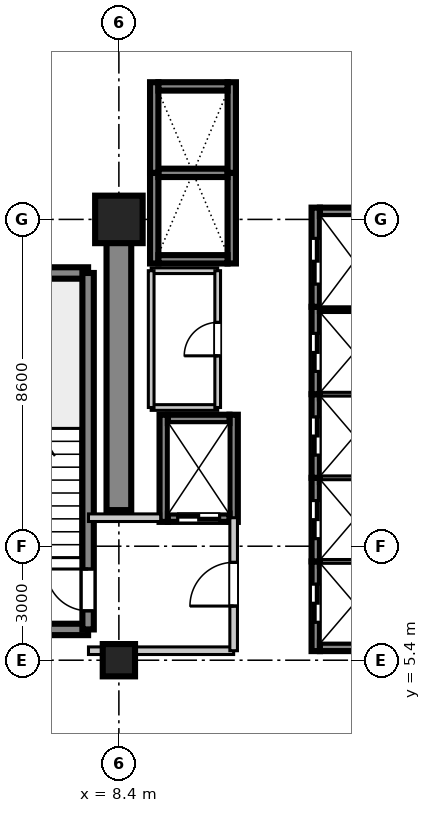
"""IFC4 building model, lengths in metres.
Left out: names, types, materials, properties, quantities, classifications, styles, units other than length and angle.
Written with IfcOpenShell. Run it as: python <this file> out.ifc"""

import sys

from ifc_helpers import new_model, si_unit, direction, frame, frame_2d, origin, origin_2d, place, context, subcontext, project, spatial, rectangle, extrude, source, transform, mapped, element, fill, save


model = new_model("IFC4")
c1 = context("Model", 3, precision=1e-05, world=origin(), true_north=direction((0.0, 1.0)))
c2 = subcontext(c1, "Body", "Model", "MODEL_VIEW")
j1 = project(units=[si_unit("LENGTHUNIT", "METRE"), si_unit("PLANEANGLEUNIT", "RADIAN")], contexts=[c1])
p1 = place(None, origin())
s1 = spatial("IfcSite", under=j1, at=p1, CompositionType="ELEMENT")
p2 = place(p1, origin())
s2 = spatial("IfcBuilding", under=s1, at=p2, CompositionType="ELEMENT")
p3 = place(p2, frame((0.0, 0.0, 124.8)))
s3 = spatial("IfcBuildingStorey", under=s2, at=p3, CompositionType="ELEMENT", Elevation=124.8)
m1 = source(origin(), c2, "Body", "SweptSolid", [
    extrude(rectangle(XDim=0.85, YDim=0.85, at=origin_2d()), origin(), (0.0, 0.0, 1.0), 3.605),
])
p4 = place(p3, frame((8.4, 5.4, 0.0), z_axis=(0.0, 0.0, 1.0), x_axis=(1.0, 0.0, 0.0)))
e1 = element("IfcColumn", 1, at=p4, inside=s3, PredefinedType="PILASTER", context=c2, shape_type="MappedRepresentation", body=[
    mapped(m1, transform((0.0, 0.0, 0.0), scale=1.0)),
])
m2 = source(origin(), c2, "Body", "SweptSolid", [
    extrude(rectangle(XDim=1.25, YDim=1.25, at=origin_2d()), origin(), (0.0, 0.0, 1.0), 3.605),
])
p5 = place(p3, frame((8.4, 17.0, 0.0), z_axis=(0.0, 0.0, 1.0), x_axis=(1.0, 0.0, 0.0)))
e2 = element("IfcColumn", 2, at=p5, inside=s3, PredefinedType="COLUMN", context=c2, shape_type="MappedRepresentation", body=[
    mapped(m2, transform((0.0, 0.0, 0.0), scale=1.0)),
])
m3 = source(origin(), c2, "Body", "SweptSolid", [
    extrude(rectangle(XDim=7.65, YDim=0.65, at=frame_2d((3.825, 0.0))), origin(), (0.0, 0.0, 1.0), 3.38),
])
p6 = place(p3, frame((8.4, 9.35, 0.0), z_axis=(0.0, 0.0, 1.0), x_axis=(0.0, 1.0, 0.0)))
e3 = element("IfcWall", 3, at=p6, inside=s3, PredefinedType="SHEAR", context=c2, shape_type="MappedRepresentation", body=[
    mapped(m3, transform((0.0, 0.0, 0.0), scale=1.0)),
])
m4 = source(origin(), c2, "Body", "SweptSolid", [
    extrude(rectangle(XDim=3.98, YDim=0.3, at=frame_2d((1.99, 0.0))), origin(), (0.0, 0.0, 1.0), 3.38),
])
for number, where, z_axis, x_axis in (
    (4, (3.61, 6.21, 0.0), (0.0, 0.0, 1.0), (1.0, 0.0, 0.0)),
    (5, (3.61, 15.59, 0.0), (0.0, 0.0, 1.0), (1.0, 0.0, 0.0)),
):
    element("IfcWall", number, at=place(p3, frame(where, z_axis=z_axis, x_axis=x_axis)), inside=s3, PredefinedType="SHEAR", context=c2, shape_type="MappedRepresentation", body=[
        mapped(m4, transform((0.0, 0.0, 0.0), scale=1.0)),
    ])
m5 = source(origin(), c2, "Body", "SweptSolid", [
    extrude(rectangle(XDim=9.38, YDim=0.3, at=frame_2d((4.69, 0.0))), origin(), (0.0, 0.0, 1.0), 3.38),
])
p7 = place(p3, frame((7.59, 6.21, 0.0), z_axis=(0.0, 0.0, 1.0), x_axis=(0.0, 1.0, 0.0)))
e6 = element("IfcWall", 6, at=p7, inside=s3, PredefinedType="SHEAR", context=c2, shape_type="MappedRepresentation", body=[
    mapped(m5, transform((0.0, 0.0, 0.0), scale=1.0)),
])
p8 = place(p7, frame((0.49, 0.0, 0.0)))
e7 = element("IfcOpeningElement", 7, at=p8, cuts=e6, PredefinedType="OPENING", context=c2, shape_type="SweptSolid", body=[
    extrude(rectangle(XDim=1.1, YDim=2.15, at=frame_2d((0.55, 1.075))), frame((0.0, 0.16, 0.0), z_axis=(0.0, -1.0, 0.0), x_axis=(1.0, 0.0, 0.0)), (0.0, 0.0, 1.0), 0.32),
])
m6 = source(origin(), c2, "Body", "SweptSolid", [
    extrude(rectangle(XDim=2.36, YDim=0.22, at=frame_2d((1.18, 0.0))), origin(), (0.0, 0.0, 1.0), 3.38),
])
p9 = place(p3, frame((13.58, 5.64, 0.0), z_axis=(0.0, 0.0, 1.0), x_axis=(0.0, 1.0, 0.0)))
e8 = element("IfcWall", 8, at=p9, inside=s3, PredefinedType="SHEAR", context=c2, shape_type="MappedRepresentation", body=[
    mapped(m6, transform((0.0, 0.0, 0.0), scale=1.0)),
])
p10 = place(p9, frame((0.76, 0.0, 0.0)))
e9 = element("IfcOpeningElement", 9, at=p10, cuts=e8, PredefinedType="OPENING", context=c2, shape_type="SweptSolid", body=[
    extrude(rectangle(XDim=1.0, YDim=2.2, at=frame_2d((0.5, 1.1))), frame((0.0, 0.12, 0.0), z_axis=(0.0, -1.0, 0.0), x_axis=(1.0, 0.0, 0.0)), (0.0, 0.0, 1.0), 0.24),
])
m7 = source(origin(), c2, "Body", "SweptSolid", [
    extrude(rectangle(XDim=1.82, YDim=0.22, at=frame_2d((0.91, 0.0))), origin(), (0.0, 0.0, 1.0), 3.38),
])
p11 = place(p3, frame((13.69, 5.75, 0.0), z_axis=(0.0, 0.0, 1.0), x_axis=(1.0, 0.0, 0.0)))
e10 = element("IfcWall", 10, at=p11, inside=s3, PredefinedType="SHEAR", context=c2, shape_type="MappedRepresentation", body=[
    mapped(m7, transform((0.0, 0.0, 0.0), scale=1.0)),
])
m8 = source(origin(), c2, "Body", "SweptSolid", [
    extrude(rectangle(XDim=1.82, YDim=0.22, at=frame_2d((0.91, 0.0))), origin(), (0.0, 0.0, 1.0), 3.65),
])
p12 = place(p3, frame((13.69, 8.0, 0.0), z_axis=(0.0, 0.0, 1.0), x_axis=(1.0, 0.0, 0.0)))
e11 = element("IfcWall", 11, at=p12, inside=s3, PredefinedType="SHEAR", context=c2, shape_type="MappedRepresentation", body=[
    mapped(m8, transform((0.0, 0.0, 0.0), scale=1.0)),
])
m9 = source(origin(), c2, "Body", "SweptSolid", [
    extrude(rectangle(XDim=2.2, YDim=0.22, at=frame_2d((1.1, 0.0))), origin(), (0.0, 0.0, 1.0), 3.38),
])
p13 = place(p3, frame((13.58, 8.0, 0.0), z_axis=(0.0, 0.0, 1.0), x_axis=(0.0, 1.0, 0.0)))
e12 = element("IfcWall", 12, at=p13, inside=s3, PredefinedType="SHEAR", context=c2, shape_type="MappedRepresentation", body=[
    mapped(m9, transform((0.0, 0.0, 0.0), scale=1.0)),
])
p14 = place(p13, frame((0.6, 0.0, 0.0)))
e13 = element("IfcOpeningElement", 13, at=p14, cuts=e12, PredefinedType="OPENING", context=c2, shape_type="SweptSolid", body=[
    extrude(rectangle(XDim=1.0, YDim=2.2, at=frame_2d((0.5, 1.1))), frame((0.0, 0.12, 0.0), z_axis=(0.0, -1.0, 0.0), x_axis=(1.0, 0.0, 0.0)), (0.0, 0.0, 1.0), 0.24),
])
p15 = place(p3, frame((13.69, 10.2, 0.0), z_axis=(0.0, 0.0, 1.0), x_axis=(1.0, 0.0, 0.0)))
e14 = element("IfcWall", 14, at=p15, inside=s3, PredefinedType="SHEAR", context=c2, shape_type="MappedRepresentation", body=[
    mapped(m8, transform((0.0, 0.0, 0.0), scale=1.0)),
])
p16 = place(p3, frame((13.58, 10.2, 0.0), z_axis=(0.0, 0.0, 1.0), x_axis=(0.0, 1.0, 0.0)))
e15 = element("IfcWall", 15, at=p16, inside=s3, PredefinedType="SHEAR", context=c2, shape_type="MappedRepresentation", body=[
    mapped(m9, transform((0.0, 0.0, 0.0), scale=1.0)),
])
p17 = place(p16, frame((0.6, 0.0, 0.0)))
e16 = element("IfcOpeningElement", 16, at=p17, cuts=e15, PredefinedType="OPENING", context=c2, shape_type="SweptSolid", body=[
    extrude(rectangle(XDim=1.0, YDim=2.2, at=frame_2d((0.5, 1.1))), frame((0.0, 0.12, 0.0), z_axis=(0.0, -1.0, 0.0), x_axis=(1.0, 0.0, 0.0)), (0.0, 0.0, 1.0), 0.24),
])
p18 = place(p3, frame((13.69, 12.4, 0.0), z_axis=(0.0, 0.0, 1.0), x_axis=(1.0, 0.0, 0.0)))
e17 = element("IfcWall", 17, at=p18, inside=s3, PredefinedType="SHEAR", context=c2, shape_type="MappedRepresentation", body=[
    mapped(m8, transform((0.0, 0.0, 0.0), scale=1.0)),
])
m10 = source(origin(), c2, "Body", "SweptSolid", [
    extrude(rectangle(XDim=2.3, YDim=0.22, at=frame_2d((1.15, 0.0))), origin(), (0.0, 0.0, 1.0), 3.38),
])
p19 = place(p3, frame((13.58, 12.4, 0.0), z_axis=(0.0, 0.0, 1.0), x_axis=(0.0, 1.0, 0.0)))
e18 = element("IfcWall", 18, at=p19, inside=s3, PredefinedType="SHEAR", context=c2, shape_type="MappedRepresentation", body=[
    mapped(m10, transform((0.0, 0.0, 0.0), scale=1.0)),
])
p20 = place(p19, frame((0.6, 0.0, 0.0)))
e19 = element("IfcOpeningElement", 19, at=p20, cuts=e18, PredefinedType="OPENING", context=c2, shape_type="SweptSolid", body=[
    extrude(rectangle(XDim=1.0, YDim=2.2, at=frame_2d((0.5, 1.1))), frame((0.0, 0.12, 0.0), z_axis=(0.0, -1.0, 0.0), x_axis=(1.0, 0.0, 0.0)), (0.0, 0.0, 1.0), 0.24),
])
p21 = place(p3, frame((13.69, 14.7, 0.0), z_axis=(0.0, 0.0, 1.0), x_axis=(1.0, 0.0, 0.0)))
e20 = element("IfcWall", 20, at=p21, inside=s3, PredefinedType="SHEAR", context=c2, shape_type="MappedRepresentation", body=[
    mapped(m8, transform((0.0, 0.0, 0.0), scale=1.0)),
])
m11 = source(origin(), c2, "Body", "SweptSolid", [
    extrude(rectangle(XDim=2.385, YDim=0.22, at=frame_2d((1.192, 0.0))), origin(), (0.0, 0.0, 1.0), 3.38),
])
for number, where, z_axis, x_axis in (
    (21, (9.33, 15.84, 0.0), (0.0, 0.0, 1.0), (0.0, 1.0, 0.0)),
    (22, (11.37, 15.84, 0.0), (0.0, 0.0, 1.0), (0.0, 1.0, 0.0)),
):
    element("IfcWall", number, at=place(p3, frame(where, z_axis=z_axis, x_axis=x_axis)), inside=s3, PredefinedType="SHEAR", context=c2, shape_type="MappedRepresentation", body=[
        mapped(m11, transform((0.0, 0.0, 0.0), scale=1.0)),
    ])
p22 = place(p3, frame((9.44, 15.95, 0.0), z_axis=(0.0, 0.0, 1.0), x_axis=(1.0, 0.0, 0.0)))
e23 = element("IfcWall", 23, at=p22, inside=s3, PredefinedType="SHEAR", context=c2, shape_type="MappedRepresentation", body=[
    mapped(m7, transform((0.0, 0.0, 0.0), scale=1.0)),
])
p23 = place(p3, frame((9.44, 18.225, 0.0), z_axis=(0.0, 0.0, 1.0), x_axis=(1.0, 0.0, 0.0)))
e24 = element("IfcWall", 24, at=p23, inside=s3, PredefinedType="SHEAR", context=c2, shape_type="MappedRepresentation", body=[
    mapped(m8, transform((0.0, 0.0, 0.0), scale=1.0)),
])
for number, where, z_axis, x_axis in (
    (25, (9.33, 18.225, 0.0), (0.0, 0.0, 1.0), (0.0, 1.0, 0.0)),
    (26, (11.37, 18.225, 0.0), (0.0, 0.0, 1.0), (0.0, 1.0, 0.0)),
):
    element("IfcWall", number, at=place(p3, frame(where, z_axis=z_axis, x_axis=x_axis)), inside=s3, PredefinedType="SHEAR", context=c2, shape_type="MappedRepresentation", body=[
        mapped(m11, transform((0.0, 0.0, 0.0), scale=1.0)),
    ])
p24 = place(p3, frame((9.44, 20.5, 0.0), z_axis=(0.0, 0.0, 1.0), x_axis=(1.0, 0.0, 0.0)))
e27 = element("IfcWall", 27, at=p24, inside=s3, PredefinedType="SHEAR", context=c2, shape_type="MappedRepresentation", body=[
    mapped(m7, transform((0.0, 0.0, 0.0), scale=1.0)),
])
m12 = source(origin(), c2, "Body", "SweptSolid", [
    extrude(rectangle(XDim=2.82, YDim=0.22, at=frame_2d((1.41, 0.0))), origin(), (0.0, 0.0, 1.0), 3.38),
])
for number, where, z_axis, x_axis in (
    (28, (9.58, 9.04, 0.0), (0.0, 0.0, 1.0), (0.0, 1.0, 0.0)),
    (29, (11.42, 9.04, 0.0), (0.0, 0.0, 1.0), (0.0, 1.0, 0.0)),
):
    element("IfcWall", number, at=place(p3, frame(where, z_axis=z_axis, x_axis=x_axis)), inside=s3, PredefinedType="SHEAR", context=c2, shape_type="MappedRepresentation", body=[
        mapped(m12, transform((0.0, 0.0, 0.0), scale=1.0)),
    ])
m13 = source(origin(), c2, "Body", "SweptSolid", [
    extrude(rectangle(XDim=1.62, YDim=0.22, at=frame_2d((0.81, 0.0))), origin(), (0.0, 0.0, 1.0), 3.38),
])
p25 = place(p3, frame((9.69, 9.15, 0.0), z_axis=(0.0, 0.0, 1.0), x_axis=(1.0, 0.0, 0.0)))
e30 = element("IfcWall", 30, at=p25, inside=s3, PredefinedType="SHEAR", context=c2, shape_type="MappedRepresentation", body=[
    mapped(m13, transform((0.0, 0.0, 0.0), scale=1.0)),
])
p26 = place(p25, frame((0.26, 0.0, 0.0)))
e31 = element("IfcOpeningElement", 31, at=p26, cuts=e30, PredefinedType="OPENING", context=c2, shape_type="SweptSolid", body=[
    extrude(rectangle(XDim=1.1, YDim=2.2, at=frame_2d((0.55, 1.1))), frame((0.0, 0.12, 0.0), z_axis=(0.0, -1.0, 0.0), x_axis=(1.0, 0.0, 0.0)), (0.0, 0.0, 1.0), 0.24),
])
p27 = place(p3, frame((9.69, 11.75, 0.0), z_axis=(0.0, 0.0, 1.0), x_axis=(1.0, 0.0, 0.0)))
e32 = element("IfcWall", 32, at=p27, inside=s3, PredefinedType="SHEAR", context=c2, shape_type="MappedRepresentation", body=[
    mapped(m13, transform((0.0, 0.0, 0.0), scale=1.0)),
])
m14 = source(origin(), c2, "Body", "SweptSolid", [
    extrude(rectangle(XDim=2.61, YDim=0.22, at=frame_2d((1.305, 0.0))), origin(), (0.0, 0.0, 1.0), 3.38),
])
p28 = place(p3, frame((13.58, 14.7, 0.0), z_axis=(0.0, 0.0, 1.0), x_axis=(0.0, 1.0, 0.0)))
e33 = element("IfcWall", 33, at=p28, inside=s3, PredefinedType="SHEAR", context=c2, shape_type="MappedRepresentation", body=[
    mapped(m14, transform((0.0, 0.0, 0.0), scale=1.0)),
])
p29 = place(p28, frame((0.6, 0.0, 0.0)))
e34 = element("IfcOpeningElement", 34, at=p29, cuts=e33, PredefinedType="OPENING", context=c2, shape_type="SweptSolid", body=[
    extrude(rectangle(XDim=1.2, YDim=2.2, at=frame_2d((0.6, 1.1))), frame((0.0, 0.12, 0.0), z_axis=(0.0, -1.0, 0.0), x_axis=(1.0, 0.0, 0.0)), (0.0, 0.0, 1.0), 0.24),
])
p30 = place(p3, frame((13.69, 17.2, 0.0), z_axis=(0.0, 0.0, 1.0), x_axis=(1.0, 0.0, 0.0)))
e35 = element("IfcWall", 35, at=p30, inside=s3, PredefinedType="SHEAR", context=c2, shape_type="MappedRepresentation", body=[
    mapped(m7, transform((0.0, 0.0, 0.0), scale=1.0)),
])
m15 = source(origin(), c2, "Body", "SweptSolid", [
    extrude(rectangle(XDim=3.82, YDim=0.2, at=frame_2d((1.91, 0.0))), origin(), (0.0, 0.0, 1.0), 2.72),
])
p31 = place(p3, frame((7.6, 5.65, 0.0), z_axis=(0.0, 0.0, 1.0), x_axis=(1.0, 0.0, 0.0)))
e36 = element("IfcWall", 36, at=p31, inside=s3, PredefinedType="PARTITIONING", context=c2, shape_type="MappedRepresentation", body=[
    mapped(m15, transform((0.0, 0.0, 0.0), scale=1.0)),
])
m16 = source(origin(), c2, "Body", "SweptSolid", [
    extrude(rectangle(XDim=1.9, YDim=0.2, at=frame_2d((0.95, 0.0))), origin(), (0.0, 0.0, 1.0), 2.72),
])
p32 = place(p3, frame((7.6, 9.15, 0.0), z_axis=(0.0, 0.0, 1.0), x_axis=(1.0, 0.0, 0.0)))
e37 = element("IfcWall", 37, at=p32, inside=s3, PredefinedType="PARTITIONING", context=c2, shape_type="MappedRepresentation", body=[
    mapped(m16, transform((0.0, 0.0, 0.0), scale=1.0)),
])
m17 = source(origin(), c2, "Body", "SweptSolid", [
    extrude(rectangle(XDim=3.5, YDim=0.2, at=frame_2d((1.75, 0.0))), origin(), (0.0, 0.0, 1.0), 2.72),
])
p33 = place(p3, frame((11.42, 5.65, 0.0), z_axis=(0.0, 0.0, 1.0), x_axis=(0.0, 1.0, 0.0)))
e38 = element("IfcWall", 38, at=p33, inside=s3, PredefinedType="PARTITIONING", context=c2, shape_type="MappedRepresentation", body=[
    mapped(m17, transform((0.0, 0.0, 0.0), scale=1.0)),
])
p34 = place(p33, frame((1.175, 0.0, 0.0)))
e39 = element("IfcOpeningElement", 39, at=p34, cuts=e38, PredefinedType="OPENING", context=c2, shape_type="SweptSolid", body=[
    extrude(rectangle(XDim=1.15, YDim=2.15, at=frame_2d((0.575, 1.075))), frame((0.0, 0.11, 0.0), z_axis=(0.0, -1.0, 0.0), x_axis=(1.0, 0.0, 0.0)), (0.0, 0.0, 1.0), 0.22),
])
m18 = source(origin(), c2, "Body", "SweptSolid", [
    extrude(rectangle(XDim=1.75, YDim=0.15, at=frame_2d((0.875, 0.0))), origin(), (0.0, 0.0, 1.0), 2.72),
])
for number, where, z_axis, x_axis in (
    (40, (9.25, 12.05, 0.0), (0.0, 0.0, 1.0), (1.0, 0.0, 0.0)),
    (41, (9.25, 15.65, 0.0), (0.0, 0.0, 1.0), (1.0, 0.0, 0.0)),
):
    element("IfcWall", number, at=place(p3, frame(where, z_axis=z_axis, x_axis=x_axis)), inside=s3, PredefinedType="PARTITIONING", context=c2, shape_type="MappedRepresentation", body=[
        mapped(m18, transform((0.0, 0.0, 0.0), scale=1.0)),
    ])
m19 = source(origin(), c2, "Body", "SweptSolid", [
    extrude(rectangle(XDim=3.6, YDim=0.15, at=frame_2d((1.8, 0.0))), origin(), (0.0, 0.0, 1.0), 2.72),
])
p35 = place(p3, frame((9.25, 12.05, 0.0), z_axis=(0.0, 0.0, 1.0), x_axis=(0.0, 1.0, 0.0)))
e42 = element("IfcWall", 42, at=p35, inside=s3, PredefinedType="PARTITIONING", context=c2, shape_type="MappedRepresentation", body=[
    mapped(m19, transform((0.0, 0.0, 0.0), scale=1.0)),
])
p36 = place(p3, frame((11.0, 12.05, 0.0), z_axis=(0.0, 0.0, 1.0), x_axis=(0.0, 1.0, 0.0)))
e43 = element("IfcWall", 43, at=p36, inside=s3, PredefinedType="PARTITIONING", context=c2, shape_type="MappedRepresentation", body=[
    mapped(m19, transform((0.0, 0.0, 0.0), scale=1.0)),
])
p37 = place(p36, frame((1.36, 0.0, 0.0)))
e44 = element("IfcOpeningElement", 44, at=p37, cuts=e43, PredefinedType="OPENING", context=c2, shape_type="SweptSolid", body=[
    extrude(rectangle(XDim=0.88, YDim=2.1, at=frame_2d((0.44, 1.05))), frame((0.0, 0.085, 0.0), z_axis=(0.0, -1.0, 0.0), x_axis=(1.0, 0.0, 0.0)), (0.0, 0.0, 1.0), 0.17),
])
m20 = source(origin(), c2, "Body", "SweptSolid", [
    extrude(rectangle(XDim=1.1, YDim=2.15, at=frame_2d((0.55, 1.075))), frame((0.0, 0.025, 0.0), z_axis=(0.0, -1.0, 0.0), x_axis=(1.0, 0.0, 0.0)), (0.0, 0.0, 1.0), 0.05),
])
p38 = place(p8, origin())
e45 = element("IfcDoor", 45, at=p38, inside=s3, OperationType="SINGLE_SWING_RIGHT", PredefinedType="DOOR", context=c2, shape_type="MappedRepresentation", body=[
    mapped(m20, transform((0.0, 0.0, 0.0), scale=1.0)),
])
fill(e7, e45)
m21 = source(origin(), c2, "Body", "SweptSolid", [
    extrude(rectangle(XDim=1.0, YDim=2.2, at=frame_2d((0.5, 1.1))), frame((0.0, 0.025, 0.0), z_axis=(0.0, -1.0, 0.0), x_axis=(1.0, 0.0, 0.0)), (0.0, 0.0, 1.0), 0.05),
])
p39 = place(p10, origin())
e46 = element("IfcDoor", 46, at=p39, inside=s3, OperationType="DOUBLE_DOOR_SLIDING", PredefinedType="DOOR", context=c2, shape_type="MappedRepresentation", body=[
    mapped(m21, transform((0.0, 0.0, 0.0), scale=1.0)),
])
fill(e9, e46)
p40 = place(p14, origin())
e47 = element("IfcDoor", 47, at=p40, inside=s3, OperationType="DOUBLE_DOOR_SLIDING", PredefinedType="DOOR", context=c2, shape_type="MappedRepresentation", body=[
    mapped(m21, transform((0.0, 0.0, 0.0), scale=1.0)),
])
fill(e13, e47)
p41 = place(p17, origin())
e48 = element("IfcDoor", 48, at=p41, inside=s3, OperationType="DOUBLE_DOOR_SLIDING", PredefinedType="DOOR", context=c2, shape_type="MappedRepresentation", body=[
    mapped(m21, transform((0.0, 0.0, 0.0), scale=1.0)),
])
fill(e16, e48)
p42 = place(p20, origin())
e49 = element("IfcDoor", 49, at=p42, inside=s3, OperationType="DOUBLE_DOOR_SLIDING", PredefinedType="DOOR", context=c2, shape_type="MappedRepresentation", body=[
    mapped(m21, transform((0.0, 0.0, 0.0), scale=1.0)),
])
fill(e19, e49)
m22 = source(origin(), c2, "Body", "SweptSolid", [
    extrude(rectangle(XDim=1.1, YDim=2.2, at=frame_2d((0.55, 1.1))), frame((0.0, 0.025, 0.0), z_axis=(0.0, -1.0, 0.0), x_axis=(1.0, 0.0, 0.0)), (0.0, 0.0, 1.0), 0.05),
])
p43 = place(p26, frame((1.1, 0.0, 0.0), z_axis=(0.0, 0.0, 1.0), x_axis=(-1.0, 0.0, 0.0)))
e50 = element("IfcDoor", 50, at=p43, inside=s3, OperationType="DOUBLE_DOOR_SLIDING", PredefinedType="DOOR", context=c2, shape_type="MappedRepresentation", body=[
    mapped(m22, transform((0.0, 0.0, 0.0), scale=1.0)),
])
fill(e31, e50)
m23 = source(origin(), c2, "Body", "SweptSolid", [
    extrude(rectangle(XDim=1.2, YDim=2.2, at=frame_2d((0.6, 1.1))), frame((0.0, 0.025, 0.0), z_axis=(0.0, -1.0, 0.0), x_axis=(1.0, 0.0, 0.0)), (0.0, 0.0, 1.0), 0.05),
])
p44 = place(p29, origin())
e51 = element("IfcDoor", 51, at=p44, inside=s3, OperationType="DOUBLE_DOOR_SLIDING", PredefinedType="DOOR", context=c2, shape_type="MappedRepresentation", body=[
    mapped(m23, transform((0.0, 0.0, 0.0), scale=1.0)),
])
fill(e34, e51)
m24 = source(origin(), c2, "Body", "SweptSolid", [
    extrude(rectangle(XDim=1.15, YDim=2.15, at=frame_2d((0.575, 1.075))), frame((0.0, 0.025, 0.0), z_axis=(0.0, -1.0, 0.0), x_axis=(1.0, 0.0, 0.0)), (0.0, 0.0, 1.0), 0.05),
])
p45 = place(p34, frame((1.15, 0.0, 0.0), z_axis=(0.0, 0.0, 1.0), x_axis=(-1.0, 0.0, 0.0)))
e52 = element("IfcDoor", 52, at=p45, inside=s3, OperationType="SINGLE_SWING_LEFT", PredefinedType="DOOR", context=c2, shape_type="MappedRepresentation", body=[
    mapped(m24, transform((0.0, 0.0, 0.0), scale=1.0)),
])
fill(e39, e52)
m25 = source(origin(), c2, "Body", "SweptSolid", [
    extrude(rectangle(XDim=0.88, YDim=2.1, at=frame_2d((0.44, 1.05))), frame((0.0, 0.025, 0.0), z_axis=(0.0, -1.0, 0.0), x_axis=(1.0, 0.0, 0.0)), (0.0, 0.0, 1.0), 0.05),
])
p46 = place(p37, origin())
e53 = element("IfcDoor", 53, at=p46, inside=s3, OperationType="SINGLE_SWING_LEFT", PredefinedType="DOOR", context=c2, shape_type="MappedRepresentation", body=[
    mapped(m25, transform((0.0, 0.0, 0.0), scale=1.0)),
])
fill(e44, e53)
save(model, sys.argv[1])
